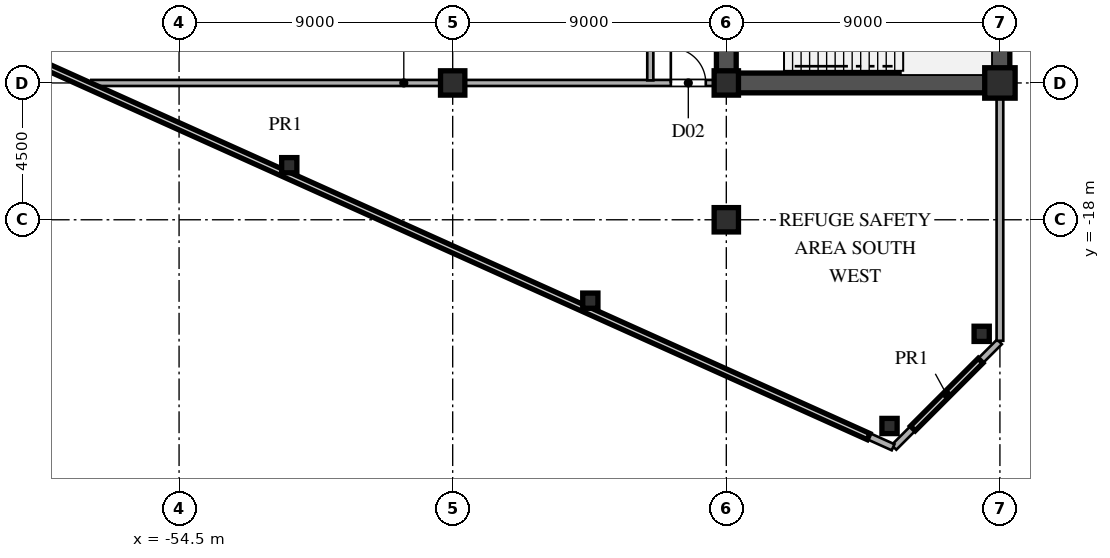
"""IFC4 building model, lengths in metres.
Left out: names, types, materials, properties, quantities, classifications, styles, units other than length and angle.
Written with IfcOpenShell. Run it as: python <this file> out.ifc"""

import sys

from ifc_helpers import new_model, si_unit, direction, frame, frame_2d, origin, origin_2d, place, context, subcontext, project, spatial, rectangle, hollow_rectangle, i_section, extrude, source, transform, mapped, element, fill, save


model = new_model("IFC4")
c1 = context("Model", 3, precision=1e-05, world=origin(), true_north=direction((0.0, 1.0)))
c2 = subcontext(c1, "Body", "Model", "MODEL_VIEW")
j1 = project(units=[si_unit("LENGTHUNIT", "METRE"), si_unit("PLANEANGLEUNIT", "RADIAN")], contexts=[c1])
p1 = place(None, origin())
s1 = spatial("IfcSite", under=j1, at=p1, CompositionType="ELEMENT")
p2 = place(p1, origin())
s2 = spatial("IfcBuilding", under=s1, at=p2, CompositionType="ELEMENT")
p3 = place(p2, frame((0.0, 0.0, 87.3)))
s3 = spatial("IfcBuildingStorey", under=s2, at=p3, CompositionType="ELEMENT", Elevation=87.3)
m1 = source(origin(), c2, "Body", "SweptSolid", [
    extrude(hollow_rectangle(XDim=1.0, YDim=1.0, WallThickness=0.042, at=origin_2d()), origin(), (0.0, 0.0, 1.0), 5.1),
])
p4 = place(p3, frame((-27.5, -13.5, 0.0), z_axis=(0.0, 0.0, 1.0), x_axis=(1.0, 0.0, 0.0)))
e1 = element("IfcColumn", 1, at=p4, inside=s3, PredefinedType="COLUMN", context=c2, shape_type="MappedRepresentation", body=[
    mapped(m1, transform((0.0, 0.0, 0.0), scale=1.0)),
])
m2 = source(origin(), c2, "Body", "SweptSolid", [
    extrude(i_section(OverallWidth=0.8, OverallDepth=0.8, WebThickness=0.032, FlangeThickness=0.05, at=origin_2d()), origin(), (0.0, 0.0, 1.0), 5.1),
])
for number, where, z_axis, x_axis in (
    (2, (-36.5, -18.0, 0.0), (0.0, 0.0, 1.0), (1.0, 0.0, 0.0)),
    (3, (-36.5, -13.5, 0.0), (0.0, 0.0, 1.0), (1.0, 0.0, 0.0)),
    (4, (-45.5, -13.5, 0.0), (0.0, 0.0, 1.0), (1.0, 0.0, 0.0)),
):
    element("IfcColumn", number, at=place(p3, frame(where, z_axis=z_axis, x_axis=x_axis)), inside=s3, PredefinedType="COLUMN", context=c2, shape_type="MappedRepresentation", body=[
        mapped(m2, transform((0.0, 0.0, 0.0), scale=1.0)),
    ])
m3 = source(origin(), c2, "Body", "SweptSolid", [
    extrude(hollow_rectangle(XDim=0.5, YDim=0.5, WallThickness=0.02, at=origin_2d()), origin(), (0.0, 0.0, 1.0), 5.1),
])
for number, where, z_axis, x_axis in (
    (5, (-28.1, -21.751, 0.0), (0.0, 0.0, 1.0), (1.0, 0.0, 0.0)),
    (6, (-31.131, -24.783, 0.0), (0.0, 0.0, 1.0), (1.0, 0.0, 0.0)),
    (7, (-40.973, -20.661, 0.0), (0.0, 0.0, 1.0), (1.0, 0.0, 0.0)),
    (8, (-50.875, -16.205, 0.0), (0.0, 0.0, 1.0), (1.0, 0.0, 0.0)),
):
    element("IfcColumn", number, at=place(p3, frame(where, z_axis=z_axis, x_axis=x_axis)), inside=s3, PredefinedType="COLUMN", context=c2, shape_type="MappedRepresentation", body=[
        mapped(m3, transform((0.0, 0.0, 0.0), scale=1.0)),
    ])
p5 = place(p3, frame((-27.5, -21.98, 0.0), z_axis=(0.0, 0.0, 1.0), x_axis=(0.0, 1.0, 0.0)))
e9 = element("IfcWall", 9, at=p5, inside=s3, PredefinedType="PARAPET", context=c2, shape_type="SweptSolid", body=[
    extrude(rectangle(XDim=8.46, YDim=0.22, at=frame_2d((4.23, 0.0))), origin(), (0.0, 0.0, 1.0), 1.25),
])
p6 = place(p3, frame((-70.982, -7.508, 0.0), z_axis=(0.0, 0.0, 1.0), x_axis=(0.911922547569, -0.410362360889, 0.0)))
e10 = element("IfcWall", 10, at=p6, inside=s3, PredefinedType="PARAPET", context=c2, shape_type="SweptSolid", body=[
    extrude(rectangle(XDim=43.823, YDim=0.22, at=frame_2d((21.912, 0.0))), origin(), (0.0, 0.0, 1.0), 1.25),
])
p7 = place(p3, frame((-30.986, -25.486, 0.0), z_axis=(0.0, 0.0, 1.0), x_axis=(0.707106781187, 0.707106781187, 0.0)))
e11 = element("IfcWall", 11, at=p7, inside=s3, PredefinedType="PARAPET", context=c2, shape_type="SweptSolid", body=[
    extrude(rectangle(XDim=4.91, YDim=0.22, at=frame_2d((2.455, 0.0))), origin(), (0.0, 0.0, 1.0), 1.25),
])
p8 = place(p3, frame((-27.5, -13.5, 0.0), z_axis=(0.0, 0.0, 1.0), x_axis=(0.0, 1.0, 0.0)))
e12 = element("IfcWall", 12, at=p8, inside=s3, PredefinedType="SHEAR", context=c2, shape_type="SweptSolid", body=[
    extrude(rectangle(XDim=12.2, YDim=0.65, at=frame_2d((6.1, 0.0))), origin(), (0.0, 0.0, 1.0), 4.88),
])
p9 = place(p3, frame((-36.5, -13.5, 0.0), z_axis=(0.0, 0.0, 1.0), x_axis=(1.0, 0.0, 0.0)))
e13 = element("IfcWall", 13, at=p9, inside=s3, PredefinedType="SHEAR", context=c2, shape_type="SweptSolid", body=[
    extrude(rectangle(XDim=9.0, YDim=0.65, at=frame_2d((4.5, 0.0))), origin(), (0.0, 0.0, 1.0), 4.88),
])
p10 = place(p3, frame((-36.5, -13.65, 0.0), z_axis=(0.0, 0.0, 1.0), x_axis=(0.0, 1.0, 0.0)))
e14 = element("IfcWall", 14, at=p10, inside=s3, PredefinedType="SHEAR", context=c2, shape_type="SweptSolid", body=[
    extrude(rectangle(XDim=7.15, YDim=0.65, at=frame_2d((3.575, 0.0))), origin(), (0.0, 0.0, 1.0), 4.88),
])
p11 = place(p10, frame((4.675, 0.0, 0.0)))
e15 = element("IfcOpeningElement", 15, at=p11, cuts=e14, PredefinedType="OPENING", context=c2, shape_type="SweptSolid", body=[
    extrude(rectangle(XDim=1.15, YDim=2.2, at=frame_2d((0.575, 1.1))), frame((0.0, 0.335, 0.0), z_axis=(0.0, -1.0, 0.0), x_axis=(1.0, 0.0, 0.0)), (0.0, 0.0, 1.0), 0.67),
])
p12 = place(p3, frame((-57.386, -13.5, 0.0), z_axis=(0.0, 0.0, 1.0), x_axis=(1.0, 0.0, 0.0)))
e16 = element("IfcWall", 16, at=p12, inside=s3, PredefinedType="PARTITIONING", context=c2, shape_type="SweptSolid", body=[
    extrude(rectangle(XDim=11.866, YDim=0.2, at=frame_2d((5.933, 0.0))), origin(), (0.0, 0.0, 1.0), 4.88),
])
p13 = place(p3, frame((-45.52, -13.5, 0.0), z_axis=(0.0, 0.0, 1.0), x_axis=(1.0, 0.0, 0.0)))
e17 = element("IfcWall", 17, at=p13, inside=s3, PredefinedType="PARTITIONING", context=c2, shape_type="SweptSolid", body=[
    extrude(rectangle(XDim=8.69, YDim=0.2, at=frame_2d((4.345, 0.0))), origin(), (0.0, 0.0, 1.0), 4.18),
])
p14 = place(p13, frame((7.195, 0.0, 0.0)))
e18 = element("IfcOpeningElement", 18, at=p14, cuts=e17, PredefinedType="OPENING", context=c2, shape_type="SweptSolid", body=[
    extrude(rectangle(XDim=1.15, YDim=2.2, at=frame_2d((0.575, 1.1))), frame((0.0, 0.11, 0.0), z_axis=(0.0, -1.0, 0.0), x_axis=(1.0, 0.0, 0.0)), (0.0, 0.0, 1.0), 0.22),
])
p15 = place(p3, frame((-39.0, -13.415, 0.0), z_axis=(0.0, 0.0, 1.0), x_axis=(0.0, 1.0, 0.0)))
e19 = element("IfcWall", 19, at=p15, inside=s3, PredefinedType="PARTITIONING", context=c2, shape_type="SweptSolid", body=[
    extrude(rectangle(XDim=26.83, YDim=0.2, at=frame_2d((13.415, 0.0))), origin(), (0.0, 0.0, 1.0), 4.88),
])
p16 = place(p15, frame((4.04, 0.0, 0.0)))
e20 = element("IfcOpeningElement", 20, at=p16, cuts=e19, PredefinedType="OPENING", context=c2, shape_type="SweptSolid", body=[
    extrude(rectangle(XDim=1.15, YDim=2.2, at=frame_2d((0.575, 1.1))), frame((0.0, 0.11, 0.0), z_axis=(0.0, -1.0, 0.0), x_axis=(1.0, 0.0, 0.0)), (0.0, 0.0, 1.0), 0.22),
])
p17 = place(p15, frame((11.34, 0.0, 0.0)))
e21 = element("IfcOpeningElement", 21, at=p17, cuts=e19, PredefinedType="OPENING", context=c2, shape_type="SweptSolid", body=[
    extrude(rectangle(XDim=1.15, YDim=2.2, at=frame_2d((0.575, 1.1))), frame((0.0, 0.11, 0.0), z_axis=(0.0, -1.0, 0.0), x_axis=(1.0, 0.0, 0.0)), (0.0, 0.0, 1.0), 0.22),
])
p18 = place(p15, frame((17.59, 0.0, 0.0)))
e22 = element("IfcOpeningElement", 22, at=p18, cuts=e19, PredefinedType="OPENING", context=c2, shape_type="SweptSolid", body=[
    extrude(rectangle(XDim=1.15, YDim=2.2, at=frame_2d((0.575, 1.1))), frame((0.0, 0.11, 0.0), z_axis=(0.0, -1.0, 0.0), x_axis=(1.0, 0.0, 0.0)), (0.0, 0.0, 1.0), 0.22),
])
p19 = place(p15, frame((23.39, 0.0, 0.0)))
e23 = element("IfcOpeningElement", 23, at=p19, cuts=e19, PredefinedType="OPENING", context=c2, shape_type="SweptSolid", body=[
    extrude(rectangle(XDim=1.15, YDim=2.2, at=frame_2d((0.575, 1.1))), frame((0.0, 0.11, 0.0), z_axis=(0.0, -1.0, 0.0), x_axis=(1.0, 0.0, 0.0)), (0.0, 0.0, 1.0), 0.22),
])
m4 = source(origin(), c2, "Body", "SweptSolid", [
    extrude(rectangle(XDim=1.15, YDim=2.2, at=frame_2d((0.575, 1.1))), frame((0.0, 0.025, 0.0), z_axis=(0.0, -1.0, 0.0), x_axis=(1.0, 0.0, 0.0)), (0.0, 0.0, 1.0), 0.05),
])
p20 = place(p14, origin())
e24 = element("IfcDoor", 24, at=p20, inside=s3, OperationType="SINGLE_SWING_LEFT", PredefinedType="DOOR", context=c2, shape_type="MappedRepresentation", body=[
    mapped(m4, transform((0.0, 0.0, 0.0), scale=1.0)),
])
fill(e18, e24)
save(model, sys.argv[1])
